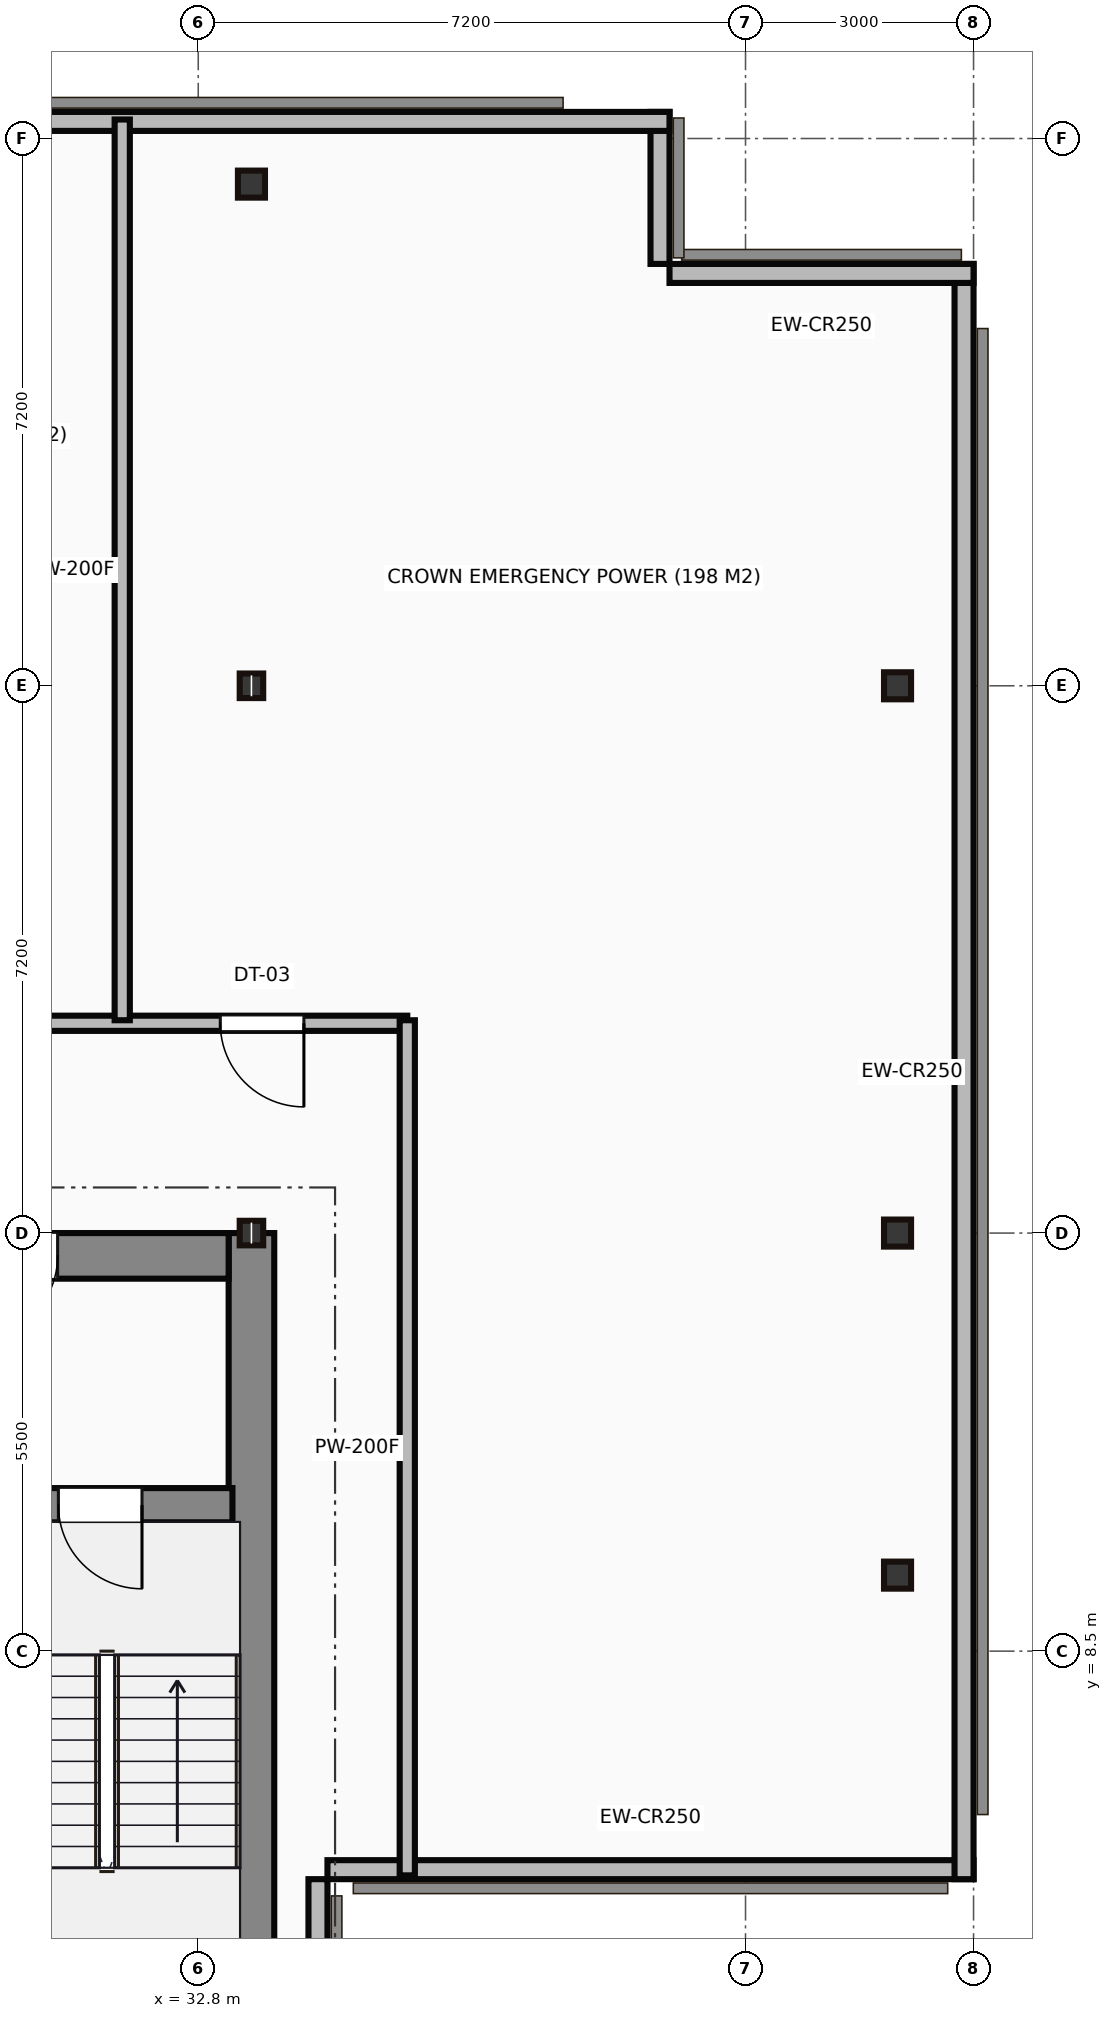
"""IFC4 building model, lengths in metres.
Left out: names, types, materials, properties, quantities, classifications, styles, units other than length and angle.
Written with IfcOpenShell. Run it as: python <this file> out.ifc"""

import sys

from ifc_helpers import new_model, si_unit, direction, frame, frame_2d, origin, origin_2d, place, context, subcontext, project, spatial, rectangle, hollow_rectangle, i_section, extrude, source, transform, mapped, element, fill, save


model = new_model("IFC4")
c1 = context("Model", 3, precision=1e-05, world=origin(), true_north=direction((0.0, 1.0)))
c2 = subcontext(c1, "Body", "Model", "MODEL_VIEW")
j1 = project(units=[si_unit("LENGTHUNIT", "METRE"), si_unit("PLANEANGLEUNIT", "RADIAN")], contexts=[c1])
p1 = place(None, origin())
s1 = spatial("IfcSite", under=j1, at=p1, CompositionType="ELEMENT")
p2 = place(p1, origin())
s2 = spatial("IfcBuilding", under=s1, at=p2, CompositionType="ELEMENT")
p3 = place(p2, frame((0.0, 0.0, 307.45)))
s3 = spatial("IfcBuildingStorey", under=s2, at=p3, CompositionType="ELEMENT", Elevation=307.45)
m1 = source(origin(), c2, "Body", "SweptSolid", [
    extrude(rectangle(XDim=13.1, YDim=0.6, at=frame_2d((6.55, 0.0))), origin(), (0.0, 0.0, 1.0), 3.8),
])
p4 = place(p3, frame((33.5, 0.9, 0.0), z_axis=(0.0, 0.0, 1.0), x_axis=(0.0, 1.0, 0.0)))
e1 = element("IfcWall", 1, at=p4, inside=s3, PredefinedType="SHEAR", context=c2, shape_type="MappedRepresentation", body=[
    mapped(m1, transform((0.0, 0.0, 0.0))),
])
m2 = source(origin(), c2, "Body", "SweptSolid", [
    extrude(rectangle(XDim=12.6, YDim=0.6, at=frame_2d((6.3, 0.0))), origin(), (0.0, 0.0, 1.0), 3.8),
])
p5 = place(p3, frame((20.6, 13.7, 0.0), z_axis=(0.0, 0.0, 1.0), x_axis=(1.0, 0.0, 0.0)))
e2 = element("IfcWall", 2, at=p5, inside=s3, PredefinedType="SHEAR", context=c2, shape_type="MappedRepresentation", body=[
    mapped(m2, transform((0.0, 0.0, 0.0))),
])
p6 = place(p5, frame((9.25, 0.0, 0.0)))
e3 = element("IfcOpeningElement", 3, at=p6, cuts=e2, PredefinedType="OPENING", context=c2, shape_type="SweptSolid", body=[
    extrude(rectangle(XDim=1.1, YDim=2.15, at=frame_2d((0.55, 1.075))), frame((0.0, 0.31, 0.0), z_axis=(0.0, -1.0, 0.0), x_axis=(1.0, 0.0, 0.0)), (0.0, 0.0, 1.0), 0.62),
])
m3 = source(origin(), c2, "Body", "SweptSolid", [
    extrude(rectangle(XDim=3.39, YDim=0.45, at=frame_2d((1.695, 0.0))), origin(), (0.0, 0.0, 1.0), 3.8),
])
p7 = place(p3, frame((29.86, 10.42, 0.0), z_axis=(0.0, 0.0, 1.0), x_axis=(1.0, 0.0, 0.0)))
e4 = element("IfcWall", 4, at=p7, inside=s3, PredefinedType="SHEAR", context=c2, shape_type="MappedRepresentation", body=[
    mapped(m3, transform((0.0, 0.0, 0.0))),
])
p8 = place(p7, frame((1.1, 0.0, 0.0)))
e5 = element("IfcOpeningElement", 5, at=p8, cuts=e4, PredefinedType="OPENING", context=c2, shape_type="SweptSolid", body=[
    extrude(rectangle(XDim=1.1, YDim=2.15, at=frame_2d((0.55, 1.075))), frame((0.0, 0.235, 0.0), z_axis=(0.0, -1.0, 0.0), x_axis=(1.0, 0.0, 0.0)), (0.0, 0.0, 1.0), 0.47),
])
m4 = source(origin(), c2, "Body", "SweptSolid", [
    extrude(i_section(OverallWidth=0.309, OverallDepth=0.323, WebThickness=0.014, FlangeThickness=0.023, at=origin_2d()), origin(), (0.0, 0.0, 1.0), 3.8),
])
for number, where, z_axis, x_axis in (
    (6, (33.5, 14.0, 0.0), (0.0, 0.0, 1.0), (1.0, 0.0, 0.0)),
    (7, (33.5, 21.2, 0.0), (0.0, 0.0, 1.0), (1.0, 0.0, 0.0)),
):
    element("IfcColumn", number, at=place(p3, frame(where, z_axis=z_axis, x_axis=x_axis)), inside=s3, PredefinedType="COLUMN", context=c2, shape_type="MappedRepresentation", body=[
        mapped(m4, transform((0.0, 0.0, 0.0))),
    ])
m5 = source(origin(), c2, "Body", "SweptSolid", [
    extrude(hollow_rectangle(XDim=0.356, YDim=0.356, WallThickness=0.019, at=origin_2d()), origin(), (0.0, 0.0, 1.0), 3.8),
])
for number, where, z_axis, x_axis in (
    (8, (33.5, 27.8, 0.0), (0.0, 0.0, 1.0), (1.0, 0.0, 0.0)),
    (9, (42.0, 9.5, 0.0), (0.0, 0.0, 1.0), (1.0, 0.0, 0.0)),
    (10, (42.0, 14.0, 0.0), (0.0, 0.0, 1.0), (1.0, 0.0, 0.0)),
    (11, (42.0, 21.2, 0.0), (0.0, 0.0, 1.0), (1.0, 0.0, 0.0)),
):
    element("IfcColumn", number, at=place(p3, frame(where, z_axis=z_axis, x_axis=x_axis)), inside=s3, PredefinedType="COLUMN", context=c2, shape_type="MappedRepresentation", body=[
        mapped(m5, transform((0.0, 0.0, 0.0))),
    ])
m6 = source(origin(), c2, "Body", "SweptSolid", [
    extrude(rectangle(XDim=5.5, YDim=0.25, at=frame_2d((2.75, 0.0))), origin(), (0.0, 0.0, 1.0), 3.5),
])
p9 = place(p3, frame((34.375, 0.0, 0.0), z_axis=(0.0, 0.0, 1.0), x_axis=(0.0, 1.0, 0.0)))
e12 = element("IfcWall", 12, at=p9, inside=s3, PredefinedType="STANDARD", context=c2, shape_type="MappedRepresentation", body=[
    mapped(m6, transform((0.0, 0.0, 0.0))),
])
m7 = source(origin(), c2, "Body", "SweptSolid", [
    extrude(rectangle(XDim=8.5, YDim=0.25, at=frame_2d((4.25, 0.0))), origin(), (0.0, 0.0, 1.0), 3.5),
])
p10 = place(p3, frame((34.5, 5.625, 0.0), z_axis=(0.0, 0.0, 1.0), x_axis=(1.0, 0.0, 0.0)))
e13 = element("IfcWall", 13, at=p10, inside=s3, PredefinedType="STANDARD", context=c2, shape_type="MappedRepresentation", body=[
    mapped(m7, transform((0.0, 0.0, 0.0))),
])
m8 = source(origin(), c2, "Body", "SweptSolid", [
    extrude(rectangle(XDim=21.25, YDim=0.25, at=frame_2d((10.625, 0.0))), origin(), (0.0, 0.0, 1.0), 3.5),
])
p11 = place(p3, frame((42.875, 5.5, 0.0), z_axis=(0.0, 0.0, 1.0), x_axis=(0.0, 1.0, 0.0)))
e14 = element("IfcWall", 14, at=p11, inside=s3, PredefinedType="STANDARD", context=c2, shape_type="MappedRepresentation", body=[
    mapped(m8, transform((0.0, 0.0, 0.0))),
])
m9 = source(origin(), c2, "Body", "SweptSolid", [
    extrude(rectangle(XDim=4.0, YDim=0.25, at=frame_2d((2.0, 0.0))), origin(), (0.0, 0.0, 1.0), 3.5),
])
p12 = place(p3, frame((43.0, 26.625, 0.0), z_axis=(0.0, 0.0, 1.0), x_axis=(-1.0, 0.0, 0.0)))
e15 = element("IfcWall", 15, at=p12, inside=s3, PredefinedType="STANDARD", context=c2, shape_type="MappedRepresentation", body=[
    mapped(m9, transform((0.0, 0.0, 0.0))),
])
m10 = source(origin(), c2, "Body", "SweptSolid", [
    extrude(rectangle(XDim=2.0, YDim=0.25, at=frame_2d((1.0, 0.0))), origin(), (0.0, 0.0, 1.0), 3.5),
])
p13 = place(p3, frame((38.875, 26.75, 0.0), z_axis=(0.0, 0.0, 1.0), x_axis=(0.0, 1.0, 0.0)))
e16 = element("IfcWall", 16, at=p13, inside=s3, PredefinedType="STANDARD", context=c2, shape_type="MappedRepresentation", body=[
    mapped(m10, transform((0.0, 0.0, 0.0))),
])
m11 = source(origin(), c2, "Body", "SweptSolid", [
    extrude(rectangle(XDim=35.0, YDim=0.25, at=frame_2d((17.5, 0.0))), origin(), (0.0, 0.0, 1.0), 3.5),
])
p14 = place(p3, frame((39.0, 28.625, 0.0), z_axis=(0.0, 0.0, 1.0), x_axis=(-1.0, 0.0, 0.0)))
e17 = element("IfcWall", 17, at=p14, inside=s3, PredefinedType="STANDARD", context=c2, shape_type="MappedRepresentation", body=[
    mapped(m11, transform((0.0, 0.0, 0.0))),
])
m12 = source(origin(), c2, "Body", "SweptSolid", [
    extrude(rectangle(XDim=21.6, YDim=0.2, at=frame_2d((10.8, 0.0))), origin(), (0.0, 0.0, 1.0), 3.5),
])
p15 = place(p3, frame((13.95, 16.76, 0.0), z_axis=(0.0, 0.0, 1.0), x_axis=(1.0, 0.0, 0.0)))
e18 = element("IfcWall", 18, at=p15, inside=s3, PredefinedType="PARTITIONING", context=c2, shape_type="MappedRepresentation", body=[
    mapped(m12, transform((0.0, 0.0, 0.0))),
])
p16 = place(p15, frame((1.67, 0.0, 0.0)))
e19 = element("IfcOpeningElement", 19, at=p16, cuts=e18, PredefinedType="OPENING", context=c2, shape_type="SweptSolid", body=[
    extrude(rectangle(XDim=1.1, YDim=2.15, at=frame_2d((0.55, 1.075))), frame((0.0, 0.11, 0.0), z_axis=(0.0, -1.0, 0.0), x_axis=(1.0, 0.0, 0.0)), (0.0, 0.0, 1.0), 0.22),
])
p17 = place(p15, frame((7.2, 0.0, 0.0)))
e20 = element("IfcOpeningElement", 20, at=p17, cuts=e18, PredefinedType="OPENING", context=c2, shape_type="SweptSolid", body=[
    extrude(rectangle(XDim=1.1, YDim=2.15, at=frame_2d((0.55, 1.075))), frame((0.0, 0.11, 0.0), z_axis=(0.0, -1.0, 0.0), x_axis=(1.0, 0.0, 0.0)), (0.0, 0.0, 1.0), 0.22),
])
p18 = place(p15, frame((13.9, 0.0, 0.0)))
e21 = element("IfcOpeningElement", 21, at=p18, cuts=e18, PredefinedType="OPENING", context=c2, shape_type="SweptSolid", body=[
    extrude(rectangle(XDim=1.1, YDim=2.15, at=frame_2d((0.55, 1.075))), frame((0.0, 0.11, 0.0), z_axis=(0.0, -1.0, 0.0), x_axis=(1.0, 0.0, 0.0)), (0.0, 0.0, 1.0), 0.22),
])
p19 = place(p15, frame((19.14, 0.0, 0.0)))
e22 = element("IfcOpeningElement", 22, at=p19, cuts=e18, PredefinedType="OPENING", context=c2, shape_type="SweptSolid", body=[
    extrude(rectangle(XDim=1.1, YDim=2.15, at=frame_2d((0.55, 1.075))), frame((0.0, 0.11, 0.0), z_axis=(0.0, -1.0, 0.0), x_axis=(1.0, 0.0, 0.0)), (0.0, 0.0, 1.0), 0.22),
])
m13 = source(origin(), c2, "Body", "SweptSolid", [
    extrude(rectangle(XDim=11.25, YDim=0.2, at=frame_2d((5.625, 0.0))), origin(), (0.0, 0.0, 1.0), 3.5),
])
p20 = place(p3, frame((35.55, 5.55, 0.0), z_axis=(0.0, 0.0, 1.0), x_axis=(0.0, 1.0, 0.0)))
e23 = element("IfcWall", 23, at=p20, inside=s3, PredefinedType="PARTITIONING", context=c2, shape_type="MappedRepresentation", body=[
    mapped(m13, transform((0.0, 0.0, 0.0))),
])
m14 = source(origin(), c2, "Body", "SweptSolid", [
    extrude(rectangle(XDim=11.85, YDim=0.2, at=frame_2d((5.925, 0.0))), origin(), (0.0, 0.0, 1.0), 3.5),
])
p21 = place(p3, frame((31.8, 16.8, 0.0), z_axis=(0.0, 0.0, 1.0), x_axis=(0.0, 1.0, 0.0)))
e24 = element("IfcWall", 24, at=p21, inside=s3, PredefinedType="PARTITIONING", context=c2, shape_type="MappedRepresentation", body=[
    mapped(m14, transform((0.0, 0.0, 0.0))),
])
m15 = source(origin(), c2, "Body", "SweptSolid", [
    extrude(rectangle(XDim=1.1, YDim=2.15, at=frame_2d((0.55, 1.075))), frame((0.0, 0.025, 0.0), z_axis=(0.0, -1.0, 0.0), x_axis=(1.0, 0.0, 0.0)), (0.0, 0.0, 1.0), 0.05),
])
p22 = place(p8, frame((1.1, 0.0, 0.0), z_axis=(0.0, 0.0, 1.0), x_axis=(-1.0, 0.0, 0.0)))
e25 = element("IfcDoor", 25, at=p22, inside=s3, OperationType="SINGLE_SWING_RIGHT", PredefinedType="DOOR", context=c2, shape_type="MappedRepresentation", body=[
    mapped(m15, transform((0.0, 0.0, 0.0))),
])
fill(e5, e25)
p23 = place(p6, origin())
e26 = element("IfcDoor", 26, at=p23, inside=s3, OperationType="SINGLE_SWING_LEFT", PredefinedType="DOOR", context=c2, shape_type="MappedRepresentation", body=[
    mapped(m15, transform((0.0, 0.0, 0.0))),
])
fill(e3, e26)
p24 = place(p19, origin())
e27 = element("IfcDoor", 27, at=p24, inside=s3, OperationType="SINGLE_SWING_RIGHT", PredefinedType="DOOR", context=c2, shape_type="MappedRepresentation", body=[
    mapped(m15, transform((0.0, 0.0, 0.0))),
])
fill(e22, e27)
save(model, sys.argv[1])
